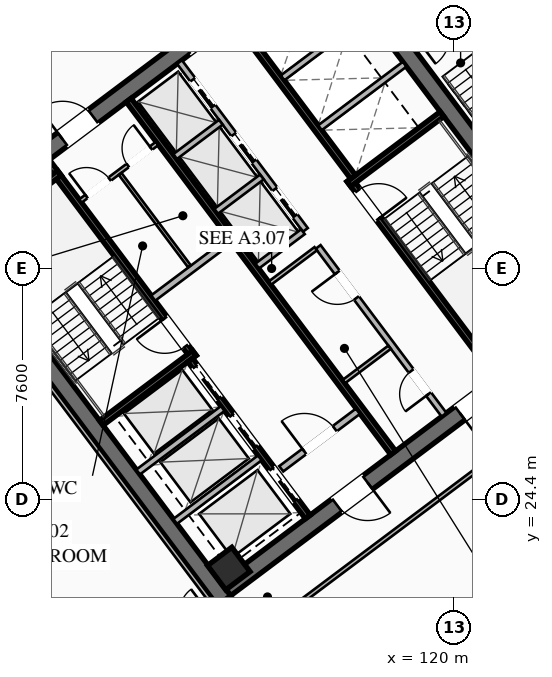
"""IFC4 building model, lengths in metres.
Left out: names, types, materials, properties, quantities, classifications, styles, units other than length and angle.
Written with IfcOpenShell. Run it as: python <this file> out.ifc"""

import sys

from ifc_helpers import new_model, si_unit, direction, frame, frame_2d, origin, origin_2d, place, context, subcontext, project, spatial, rectangle, hollow_rectangle, extrude, element, fill, save


model = new_model("IFC4")
c1 = context("Model", 3, precision=1e-05, world=origin(), true_north=direction((0.0, 1.0)))
c2 = subcontext(c1, "Body", "Model", "MODEL_VIEW")
j1 = project(units=[si_unit("LENGTHUNIT", "METRE"), si_unit("PLANEANGLEUNIT", "RADIAN")], contexts=[c1])
p1 = place(None, origin())
s1 = spatial("IfcSite", under=j1, at=p1, CompositionType="ELEMENT")
p2 = place(p1, origin())
s2 = spatial("IfcBuilding", under=s1, at=p2, CompositionType="ELEMENT")
p3 = place(p2, frame((0.0, 0.0, 181.85)))
s3 = spatial("IfcBuildingStorey", under=s2, at=p3, CompositionType="ELEMENT", Elevation=181.85)
for number, where, z_axis, x_axis in (
    (1, (112.436, 21.077, 0.0), (0.0, 0.0, 1.0), (-0.6, 0.8, 0.0)),
    (2, (115.564, 42.923, 0.0), (0.0, 0.0, 1.0), (0.6, -0.8, 0.0)),
):
    element("IfcWall", number, at=place(p3, frame(where, z_axis=z_axis, x_axis=x_axis)), inside=s3, PredefinedType="SHEAR", context=c2, shape_type="SweptSolid", body=[
        extrude(rectangle(XDim=15.6, YDim=0.55, at=frame_2d((7.8, 0.0))), origin(), (0.0, 0.0, 1.0), 3.55),
    ])
p4 = place(p3, frame((124.539, 30.498, 0.0), z_axis=(0.0, 0.0, 1.0), x_axis=(-0.799998054672, -0.600002593761, 0.0)))
e3 = element("IfcWall", 3, at=p4, inside=s3, PredefinedType="SHEAR", context=c2, shape_type="SweptSolid", body=[
    extrude(rectangle(XDim=15.06, YDim=0.55, at=frame_2d((7.53, 0.0))), origin(), (0.0, 0.0, 1.0), 3.55),
])
p5 = place(p4, frame((9.23, 0.0, 0.0)))
e4 = element("IfcOpeningElement", 4, at=p5, cuts=e3, PredefinedType="OPENING", context=c2, shape_type="SweptSolid", body=[
    extrude(rectangle(XDim=1.25, YDim=2.25, at=frame_2d((0.625, 1.125))), frame((0.0, 0.285, 0.0), z_axis=(0.0, -1.0, 0.0), x_axis=(1.0, 0.0, 0.0)), (0.0, 0.0, 1.0), 0.57),
])
p6 = place(p4, frame((4.18, 0.0, 0.0)))
e5 = element("IfcOpeningElement", 5, at=p6, cuts=e3, PredefinedType="OPENING", context=c2, shape_type="SweptSolid", body=[
    extrude(rectangle(XDim=1.25, YDim=2.25, at=frame_2d((0.625, 1.125))), frame((0.0, 0.285, 0.0), z_axis=(0.0, -1.0, 0.0), x_axis=(1.0, 0.0, 0.0)), (0.0, 0.0, 1.0), 0.57),
])
p7 = place(p3, frame((103.461, 33.502, 0.0), z_axis=(0.0, 0.0, 1.0), x_axis=(0.799998054672, 0.600002593761, 0.0)))
e6 = element("IfcWall", 6, at=p7, inside=s3, PredefinedType="SHEAR", context=c2, shape_type="SweptSolid", body=[
    extrude(rectangle(XDim=15.06, YDim=0.55, at=frame_2d((7.53, 0.0))), origin(), (0.0, 0.0, 1.0), 3.55),
])
p8 = place(p7, frame((4.58, 0.0, 0.0)))
e7 = element("IfcOpeningElement", 7, at=p8, cuts=e6, PredefinedType="OPENING", context=c2, shape_type="SweptSolid", body=[
    extrude(rectangle(XDim=1.25, YDim=2.25, at=frame_2d((0.625, 1.125))), frame((0.0, 0.285, 0.0), z_axis=(0.0, -1.0, 0.0), x_axis=(1.0, 0.0, 0.0)), (0.0, 0.0, 1.0), 0.57),
])
p9 = place(p7, frame((9.63, 0.0, 0.0)))
e8 = element("IfcOpeningElement", 8, at=p9, cuts=e6, PredefinedType="OPENING", context=c2, shape_type="SweptSolid", body=[
    extrude(rectangle(XDim=1.25, YDim=2.25, at=frame_2d((0.625, 1.125))), frame((0.0, 0.285, 0.0), z_axis=(0.0, -1.0, 0.0), x_axis=(1.0, 0.0, 0.0)), (0.0, 0.0, 1.0), 0.57),
])
p10 = place(p3, frame((112.59, 22.13, 0.0), z_axis=(0.0, 0.0, 1.0), x_axis=(0.799999996291, 0.600000004945, 0.0)))
e9 = element("IfcColumn", 9, at=p10, inside=s3, PredefinedType="COLUMN", context=c2, shape_type="SweptSolid", body=[
    extrude(hollow_rectangle(XDim=1.0, YDim=1.0, WallThickness=0.04, at=origin_2d()), origin(), (0.0, 0.0, 1.0), 3.37),
])
p11 = place(p3, frame((111.44, 29.08, 0.0), z_axis=(0.0, 0.0, 1.0), x_axis=(-0.59999029481, 0.8000072788, 0.0)))
e10 = element("IfcWall", 10, at=p11, inside=s3, PredefinedType="SHEAR", context=c2, shape_type="SweptSolid", body=[
    extrude(rectangle(XDim=8.05, YDim=0.2, at=frame_2d((4.025, 0.0))), origin(), (0.0, 0.0, 1.0), 3.37),
])
p12 = place(p11, frame((0.45, 0.0, 0.0)))
e11 = element("IfcOpeningElement", 11, at=p12, cuts=e10, PredefinedType="OPENING", context=c2, shape_type="SweptSolid", body=[
    extrude(rectangle(XDim=1.15, YDim=2.2, at=frame_2d((0.575, 1.1))), frame((0.0, 0.11, 0.0), z_axis=(0.0, -1.0, 0.0), x_axis=(1.0, 0.0, 0.0)), (0.0, 0.0, 1.0), 0.22),
])
for number, where, z_axis, x_axis in (
    (12, (108.396, 26.922, 0.0), (0.0, 0.0, 1.0), (0.8, 0.6, 0.0)),
    (13, (103.956, 32.842, 0.0), (0.0, 0.0, 1.0), (0.8, 0.6, 0.0)),
):
    element("IfcWall", number, at=place(p3, frame(where, z_axis=z_axis, x_axis=x_axis)), inside=s3, PredefinedType="SHEAR", context=c2, shape_type="SweptSolid", body=[
        extrude(rectangle(XDim=3.83, YDim=0.2, at=frame_2d((1.915, 0.0))), origin(), (0.0, 0.0, 1.0), 3.37),
    ])
p13 = place(p3, frame((116.56, 34.92, 0.0), z_axis=(0.0, 0.0, 1.0), x_axis=(0.59999029481, -0.8000072788, 0.0)))
e14 = element("IfcWall", 14, at=p13, inside=s3, PredefinedType="SHEAR", context=c2, shape_type="SweptSolid", body=[
    extrude(rectangle(XDim=8.05, YDim=0.2, at=frame_2d((4.025, 0.0))), origin(), (0.0, 0.0, 1.0), 3.37),
])
p14 = place(p13, frame((0.45, 0.0, 0.0)))
e15 = element("IfcOpeningElement", 15, at=p14, cuts=e14, PredefinedType="OPENING", context=c2, shape_type="SweptSolid", body=[
    extrude(rectangle(XDim=1.15, YDim=2.2, at=frame_2d((0.575, 1.1))), frame((0.0, 0.11, 0.0), z_axis=(0.0, -1.0, 0.0), x_axis=(1.0, 0.0, 0.0)), (0.0, 0.0, 1.0), 0.22),
])
p15 = place(p3, frame((116.54, 34.78, 0.0), z_axis=(0.0, 0.0, 1.0), x_axis=(0.800015298837, 0.599979601008, 0.0)))
e16 = element("IfcWall", 16, at=p15, inside=s3, PredefinedType="SHEAR", context=c2, shape_type="SweptSolid", body=[
    extrude(rectangle(XDim=3.83, YDim=0.2, at=frame_2d((1.915, 0.0))), origin(), (0.0, 0.0, 1.0), 3.37),
])
p16 = place(p3, frame((117.998, 25.936, 0.0), z_axis=(0.0, 0.0, 1.0), x_axis=(-0.600002693989, 0.799997979501, 0.0)))
e17 = element("IfcWall", 17, at=p16, inside=s3, PredefinedType="SHEAR", context=c2, shape_type="SweptSolid", body=[
    extrude(rectangle(XDim=14.5, YDim=0.2, at=frame_2d((7.25, 0.0))), origin(), (0.0, 0.0, 1.0), 3.37),
])
p17 = place(p3, frame((110.104, 31.028, 0.0), z_axis=(0.0, 0.0, 1.0), x_axis=(0.800018601094, 0.59997519774, 0.0)))
e18 = element("IfcWall", 18, at=p17, inside=s3, PredefinedType="SOLIDWALL", context=c2, shape_type="SweptSolid", body=[
    extrude(rectangle(XDim=3.15, YDim=0.22, at=frame_2d((1.575, 0.0))), origin(), (0.0, 0.0, 1.0), 2.723),
])
p18 = place(p3, frame((114.316, 25.412, 0.0), z_axis=(0.0, 0.0, 1.0), x_axis=(0.800018601094, 0.59997519774, 0.0)))
e19 = element("IfcWall", 19, at=p18, inside=s3, PredefinedType="SOLIDWALL", context=c2, shape_type="SweptSolid", body=[
    extrude(rectangle(XDim=3.15, YDim=0.22, at=frame_2d((1.575, 0.0))), origin(), (0.0, 0.0, 1.0), 2.723),
])
p19 = place(p18, frame((0.95, 0.0, 0.0)))
e20 = element("IfcOpeningElement", 20, at=p19, cuts=e19, PredefinedType="OPENING", context=c2, shape_type="SweptSolid", body=[
    extrude(rectangle(XDim=1.25, YDim=2.25, at=frame_2d((0.625, 1.125))), frame((0.0, 0.12, 0.0), z_axis=(0.0, -1.0, 0.0), x_axis=(1.0, 0.0, 0.0)), (0.0, 0.0, 1.0), 0.24),
])
p20 = place(p3, frame((115.19, 23.83, 0.0), z_axis=(0.0, 0.0, 1.0), x_axis=(-0.599993943644, 0.800004542231, 0.0)))
e21 = element("IfcWall", 21, at=p20, inside=s3, PredefinedType="SHEAR", context=c2, shape_type="SweptSolid", body=[
    extrude(rectangle(XDim=6.45, YDim=0.2, at=frame_2d((3.225, 0.0))), origin(), (0.0, 0.0, 1.0), 3.37),
])
p21 = place(p20, frame((4.875, 0.0, 0.0)))
e22 = element("IfcOpeningElement", 22, at=p21, cuts=e21, PredefinedType="OPENING", context=c2, shape_type="SweptSolid", body=[
    extrude(rectangle(XDim=1.3, YDim=2.25, at=frame_2d((0.65, 1.125))), frame((0.0, 0.11, 0.0), z_axis=(0.0, -1.0, 0.0), x_axis=(1.0, 0.0, 0.0)), (0.0, 0.0, 1.0), 0.22),
])
p22 = place(p20, frame((2.875, 0.0, 0.0)))
e23 = element("IfcOpeningElement", 23, at=p22, cuts=e21, PredefinedType="OPENING", context=c2, shape_type="SweptSolid", body=[
    extrude(rectangle(XDim=1.3, YDim=2.25, at=frame_2d((0.65, 1.125))), frame((0.0, 0.11, 0.0), z_axis=(0.0, -1.0, 0.0), x_axis=(1.0, 0.0, 0.0)), (0.0, 0.0, 1.0), 0.22),
])
p23 = place(p20, frame((0.675, 0.0, 0.0)))
e24 = element("IfcOpeningElement", 24, at=p23, cuts=e21, PredefinedType="OPENING", context=c2, shape_type="SweptSolid", body=[
    extrude(rectangle(XDim=1.3, YDim=2.25, at=frame_2d((0.65, 1.125))), frame((0.0, 0.11, 0.0), z_axis=(0.0, -1.0, 0.0), x_axis=(1.0, 0.0, 0.0)), (0.0, 0.0, 1.0), 0.22),
])
for number, where, z_axis, x_axis in (
    (25, (110.826, 23.682, 0.0), (0.0, 0.0, 1.0), (0.8, 0.6, 0.0)),
    (26, (109.608, 25.306, 0.0), (0.0, 0.0, 1.0), (0.8, 0.6, 0.0)),
):
    element("IfcWall", number, at=place(p3, frame(where, z_axis=z_axis, x_axis=x_axis)), inside=s3, PredefinedType="SOLIDWALL", context=c2, shape_type="SweptSolid", body=[
        extrude(rectangle(XDim=3.48, YDim=0.2, at=frame_2d((1.74, 0.0))), origin(), (0.0, 0.0, 1.0), 3.37),
    ])
p24 = place(p3, frame((112.81, 40.17, 0.0), z_axis=(0.0, 0.0, 1.0), x_axis=(0.599993943644, -0.800004542231, 0.0)))
e27 = element("IfcWall", 27, at=p24, inside=s3, PredefinedType="SHEAR", context=c2, shape_type="SweptSolid", body=[
    extrude(rectangle(XDim=6.45, YDim=0.2, at=frame_2d((3.225, 0.0))), origin(), (0.0, 0.0, 1.0), 3.37),
])
for number, where, z_axis, x_axis in (
    (28, (115.59, 36.63, 0.0), (0.0, 0.0, 1.0), (0.8, 0.6, 0.0)),
    (29, (114.36, 38.27, 0.0), (0.0, 0.0, 1.0), (0.8, 0.6, 0.0)),
):
    element("IfcWall", number, at=place(p3, frame(where, z_axis=z_axis, x_axis=x_axis)), inside=s3, PredefinedType="SOLIDWALL", context=c2, shape_type="SweptSolid", body=[
        extrude(rectangle(XDim=3.48, YDim=0.2, at=frame_2d((1.74, 0.0))), origin(), (0.0, 0.0, 1.0), 3.37),
    ])
p25 = place(p3, frame((107.71, 34.22, 0.0), z_axis=(0.0, 0.0, 1.0), x_axis=(0.799981399002, 0.60002480053, 0.0)))
e30 = element("IfcWall", 30, at=p25, inside=s3, PredefinedType="PARTITIONING", context=c2, shape_type="SweptSolid", body=[
    extrude(rectangle(XDim=3.15, YDim=0.135, at=frame_2d((1.575, 0.0))), origin(), (0.0, 0.0, 1.0), 2.723),
])
p26 = place(p25, frame((0.25, 0.0, 0.0)))
e31 = element("IfcOpeningElement", 31, at=p26, cuts=e30, PredefinedType="OPENING", context=c2, shape_type="SweptSolid", body=[
    extrude(rectangle(XDim=0.95, YDim=2.05, at=frame_2d((0.475, 1.025))), frame((0.0, 0.077, 0.0), z_axis=(0.0, -1.0, 0.0), x_axis=(1.0, 0.0, 0.0)), (0.0, 0.0, 1.0), 0.155),
])
p27 = place(p25, frame((1.95, 0.0, 0.0)))
e32 = element("IfcOpeningElement", 32, at=p27, cuts=e30, PredefinedType="OPENING", context=c2, shape_type="SweptSolid", body=[
    extrude(rectangle(XDim=0.95, YDim=2.05, at=frame_2d((0.475, 1.025))), frame((0.0, 0.077, 0.0), z_axis=(0.0, -1.0, 0.0), x_axis=(1.0, 0.0, 0.0)), (0.0, 0.0, 1.0), 0.155),
])
p28 = place(p3, frame((111.296, 32.072, 0.0), z_axis=(0.0, 0.0, 1.0), x_axis=(-0.59995887973, 0.800030838552, 0.0)))
e33 = element("IfcWall", 33, at=p28, inside=s3, PredefinedType="PARTITIONING", context=c2, shape_type="SweptSolid", body=[
    extrude(rectangle(XDim=3.8, YDim=0.11, at=frame_2d((1.9, 0.0))), origin(), (0.0, 0.0, 1.0), 2.723),
])
p29 = place(p3, frame((119.67, 27.19, 0.0), z_axis=(0.0, 0.0, 1.0), x_axis=(-0.599988677396, 0.800008491828, 0.0)))
e34 = element("IfcWall", 34, at=p29, inside=s3, PredefinedType="SOLIDWALL", context=c2, shape_type="SweptSolid", body=[
    extrude(rectangle(XDim=6.9, YDim=0.2, at=frame_2d((3.45, 0.0))), origin(), (0.0, 0.0, 1.0), 2.723),
])
p30 = place(p29, frame((0.85, 0.0, 0.0)))
e35 = element("IfcOpeningElement", 35, at=p30, cuts=e34, PredefinedType="OPENING", context=c2, shape_type="SweptSolid", body=[
    extrude(rectangle(XDim=0.95, YDim=2.05, at=frame_2d((0.475, 1.025))), frame((0.0, 0.11, 0.0), z_axis=(0.0, -1.0, 0.0), x_axis=(1.0, 0.0, 0.0)), (0.0, 0.0, 1.0), 0.22),
])
p31 = place(p29, frame((4.8, 0.0, 0.0)))
e36 = element("IfcOpeningElement", 36, at=p31, cuts=e34, PredefinedType="OPENING", context=c2, shape_type="SweptSolid", body=[
    extrude(rectangle(XDim=1.05, YDim=2.2, at=frame_2d((0.525, 1.1))), frame((0.0, 0.11, 0.0), z_axis=(0.0, -1.0, 0.0), x_axis=(1.0, 0.0, 0.0)), (0.0, 0.0, 1.0), 0.22),
])
for number, where, z_axis, x_axis in (
    (37, (113.946, 31.522, 0.0), (0.0, 0.0, 1.0), (0.8, 0.6, 0.0)),
    (38, (116.376, 28.282, 0.0), (0.0, 0.0, 1.0), (0.8, 0.6, 0.0)),
):
    element("IfcWall", number, at=place(p3, frame(where, z_axis=z_axis, x_axis=x_axis)), inside=s3, PredefinedType="PARTITIONING", context=c2, shape_type="SweptSolid", body=[
        extrude(rectangle(XDim=1.88, YDim=0.135, at=frame_2d((0.94, 0.0))), origin(), (0.0, 0.0, 1.0), 2.723),
    ])
p32 = place(p3, frame((115.11, 33.27, 0.0), z_axis=(0.0, 0.0, 1.0), x_axis=(-0.600011322243, 0.799991508192, 0.0)))
e39 = element("IfcWall", 39, at=p32, inside=s3, PredefinedType="SOLIDWALL", context=c2, shape_type="SweptSolid", body=[
    extrude(rectangle(XDim=6.9, YDim=0.2, at=frame_2d((3.45, 0.0))), origin(), (0.0, 0.0, 1.0), 3.37),
])
p33 = place(p32, frame((0.575, 0.0, 0.0)))
e40 = element("IfcOpeningElement", 40, at=p33, cuts=e39, PredefinedType="OPENING", context=c2, shape_type="SweptSolid", body=[
    extrude(rectangle(XDim=1.1, YDim=2.2, at=frame_2d((0.55, 1.1))), frame((0.0, 0.11, 0.0), z_axis=(0.0, -1.0, 0.0), x_axis=(1.0, 0.0, 0.0)), (0.0, 0.0, 1.0), 0.22),
])
p34 = place(p32, frame((2.825, 0.0, 0.0)))
e41 = element("IfcOpeningElement", 41, at=p34, cuts=e39, PredefinedType="OPENING", context=c2, shape_type="SweptSolid", body=[
    extrude(rectangle(XDim=1.1, YDim=2.2, at=frame_2d((0.55, 1.1))), frame((0.0, 0.11, 0.0), z_axis=(0.0, -1.0, 0.0), x_axis=(1.0, 0.0, 0.0)), (0.0, 0.0, 1.0), 0.22),
])
p35 = place(p32, frame((5.075, 0.0, 0.0)))
e42 = element("IfcOpeningElement", 42, at=p35, cuts=e39, PredefinedType="OPENING", context=c2, shape_type="SweptSolid", body=[
    extrude(rectangle(XDim=1.1, YDim=2.2, at=frame_2d((0.55, 1.1))), frame((0.0, 0.11, 0.0), z_axis=(0.0, -1.0, 0.0), x_axis=(1.0, 0.0, 0.0)), (0.0, 0.0, 1.0), 0.22),
])
p36 = place(p3, frame((113.526, 32.082, 0.0), z_axis=(0.0, 0.0, 1.0), x_axis=(0.800046745961, 0.599937666993, 0.0)))
e43 = element("IfcWall", 43, at=p36, inside=s3, PredefinedType="SOLIDWALL", context=c2, shape_type="SweptSolid", body=[
    extrude(rectangle(XDim=1.88, YDim=0.2, at=frame_2d((0.94, 0.0))), origin(), (0.0, 0.0, 1.0), 3.37),
])
p37 = place(p3, frame((112.176, 33.882, 0.0), z_axis=(0.0, 0.0, 1.0), x_axis=(0.8, 0.6, 0.0)))
e44 = element("IfcWall", 44, at=p37, inside=s3, PredefinedType="SOLIDWALL", context=c2, shape_type="SweptSolid", body=[
    extrude(rectangle(XDim=1.88, YDim=0.2, at=frame_2d((0.94, 0.0))), origin(), (0.0, 0.0, 1.0), 3.37),
])
p38 = place(p3, frame((110.826, 35.682, 0.0), z_axis=(0.0, 0.0, 1.0), x_axis=(0.799984418148, 0.600020775241, 0.0)))
e45 = element("IfcWall", 45, at=p38, inside=s3, PredefinedType="SOLIDWALL", context=c2, shape_type="SweptSolid", body=[
    extrude(rectangle(XDim=1.88, YDim=0.2, at=frame_2d((0.94, 0.0))), origin(), (0.0, 0.0, 1.0), 3.37),
])
p39 = place(p3, frame((96.268, 31.726, 0.0), z_axis=(0.0, 0.0, 1.0), x_axis=(0.8, 0.6, 0.0)))
e46 = element("IfcWall", 46, at=p39, inside=s3, PredefinedType="PARTITIONING", context=c2, shape_type="SweptSolid", body=[
    extrude(rectangle(XDim=28.7, YDim=0.135, at=frame_2d((14.35, 0.0))), origin(), (0.0, 0.0, 1.0), 2.723),
])
p40 = place(p39, frame((0.3, 0.0, 0.0)))
e47 = element("IfcOpeningElement", 47, at=p40, cuts=e46, PredefinedType="OPENING", context=c2, shape_type="SweptSolid", body=[
    extrude(rectangle(XDim=0.95, YDim=2.05, at=frame_2d((0.475, 1.025))), frame((0.0, 0.077, 0.0), z_axis=(0.0, -1.0, 0.0), x_axis=(1.0, 0.0, 0.0)), (0.0, 0.0, 1.0), 0.155),
])
p41 = place(p39, frame((27.45, 0.0, 0.0)))
e48 = element("IfcOpeningElement", 48, at=p41, cuts=e46, PredefinedType="OPENING", context=c2, shape_type="SweptSolid", body=[
    extrude(rectangle(XDim=0.95, YDim=2.05, at=frame_2d((0.475, 1.025))), frame((0.0, 0.077, 0.0), z_axis=(0.0, -1.0, 0.0), x_axis=(1.0, 0.0, 0.0)), (0.0, 0.0, 1.0), 0.155),
])
p42 = place(p3, frame((131.09, 33.13, 0.0), z_axis=(0.0, 0.0, 1.0), x_axis=(-0.800003062365, -0.599995916825, 0.0)))
e49 = element("IfcWall", 49, at=p42, inside=s3, PredefinedType="PARTITIONING", context=c2, shape_type="SweptSolid", body=[
    extrude(rectangle(XDim=28.7, YDim=0.135, at=frame_2d((14.35, 0.0))), origin(), (0.0, 0.0, 1.0), 2.723),
])
p43 = place(p42, frame((27.37, 0.0, 0.0)))
e50 = element("IfcOpeningElement", 50, at=p43, cuts=e49, PredefinedType="OPENING", context=c2, shape_type="SweptSolid", body=[
    extrude(rectangle(XDim=0.95, YDim=2.05, at=frame_2d((0.475, 1.025))), frame((0.0, 0.077, 0.0), z_axis=(0.0, -1.0, 0.0), x_axis=(1.0, 0.0, 0.0)), (0.0, 0.0, 1.0), 0.155),
])
p44 = place(p42, frame((0.38, 0.0, 0.0)))
e51 = element("IfcOpeningElement", 51, at=p44, cuts=e49, PredefinedType="OPENING", context=c2, shape_type="SweptSolid", body=[
    extrude(rectangle(XDim=0.95, YDim=2.05, at=frame_2d((0.475, 1.025))), frame((0.0, 0.077, 0.0), z_axis=(0.0, -1.0, 0.0), x_axis=(1.0, 0.0, 0.0)), (0.0, 0.0, 1.0), 0.155),
])
p45 = place(p3, frame((112.104, 20.928, 0.0), z_axis=(0.0, 0.0, 1.0), x_axis=(-0.599994940075, 0.800003794918, 0.0)))
e52 = element("IfcWall", 52, at=p45, inside=s3, PredefinedType="PARTITIONING", context=c2, shape_type="SweptSolid", body=[
    extrude(rectangle(XDim=15.44, YDim=0.135, at=frame_2d((7.72, 0.0))), origin(), (0.0, 0.0, 1.0), 2.723),
])
p46 = place(p8, origin())
e53 = element("IfcDoor", 53, at=p46, inside=s3, OperationType="SINGLE_SWING_LEFT", PredefinedType="DOOR", context=c2, shape_type="SweptSolid", body=[
    extrude(rectangle(XDim=1.25, YDim=2.25, at=frame_2d((0.625, 1.125))), frame((0.0, 0.025, 0.0), z_axis=(0.0, -1.0, 0.0), x_axis=(1.0, 0.0, 0.0)), (0.0, 0.0, 1.0), 0.05),
])
fill(e7, e53)
p47 = place(p5, origin())
e54 = element("IfcDoor", 54, at=p47, inside=s3, OperationType="SINGLE_SWING_LEFT", PredefinedType="DOOR", context=c2, shape_type="SweptSolid", body=[
    extrude(rectangle(XDim=1.25, YDim=2.25, at=frame_2d((0.625, 1.125))), frame((0.0, 0.025, 0.0), z_axis=(0.0, -1.0, 0.0), x_axis=(1.0, 0.0, 0.0)), (0.0, 0.0, 1.0), 0.05),
])
fill(e4, e54)
p48 = place(p6, origin())
e55 = element("IfcDoor", 55, at=p48, inside=s3, OperationType="SINGLE_SWING_RIGHT", PredefinedType="DOOR", context=c2, shape_type="SweptSolid", body=[
    extrude(rectangle(XDim=1.25, YDim=2.25, at=frame_2d((0.625, 1.125))), frame((0.0, 0.025, 0.0), z_axis=(0.0, -1.0, 0.0), x_axis=(1.0, 0.0, 0.0)), (0.0, 0.0, 1.0), 0.05),
])
fill(e5, e55)
p49 = place(p12, origin())
e56 = element("IfcDoor", 56, at=p49, inside=s3, OperationType="SINGLE_SWING_RIGHT", PredefinedType="DOOR", context=c2, shape_type="SweptSolid", body=[
    extrude(rectangle(XDim=1.15, YDim=2.2, at=frame_2d((0.575, 1.1))), frame((0.0, 0.025, 0.0), z_axis=(0.0, -1.0, 0.0), x_axis=(1.0, 0.0, 0.0)), (0.0, 0.0, 1.0), 0.05),
])
fill(e11, e56)
p50 = place(p14, origin())
e57 = element("IfcDoor", 57, at=p50, inside=s3, OperationType="SINGLE_SWING_RIGHT", PredefinedType="DOOR", context=c2, shape_type="SweptSolid", body=[
    extrude(rectangle(XDim=1.15, YDim=2.2, at=frame_2d((0.575, 1.1))), frame((0.0, 0.025, 0.0), z_axis=(0.0, -1.0, 0.0), x_axis=(1.0, 0.0, 0.0)), (0.0, 0.0, 1.0), 0.05),
])
fill(e15, e57)
p51 = place(p19, origin())
e58 = element("IfcDoor", 58, at=p51, inside=s3, OperationType="SINGLE_SWING_LEFT", PredefinedType="DOOR", context=c2, shape_type="SweptSolid", body=[
    extrude(rectangle(XDim=1.25, YDim=2.25, at=frame_2d((0.625, 1.125))), frame((0.0, 0.025, 0.0), z_axis=(0.0, -1.0, 0.0), x_axis=(1.0, 0.0, 0.0)), (0.0, 0.0, 1.0), 0.05),
])
fill(e20, e58)
p52 = place(p26, origin())
e59 = element("IfcDoor", 59, at=p52, inside=s3, OperationType="SINGLE_SWING_LEFT", PredefinedType="DOOR", context=c2, shape_type="SweptSolid", body=[
    extrude(rectangle(XDim=0.95, YDim=2.05, at=frame_2d((0.475, 1.025))), frame((0.0, 0.025, 0.0), z_axis=(0.0, -1.0, 0.0), x_axis=(1.0, 0.0, 0.0)), (0.0, 0.0, 1.0), 0.05),
])
fill(e31, e59)
p53 = place(p27, origin())
e60 = element("IfcDoor", 60, at=p53, inside=s3, OperationType="SINGLE_SWING_RIGHT", PredefinedType="DOOR", context=c2, shape_type="SweptSolid", body=[
    extrude(rectangle(XDim=0.95, YDim=2.05, at=frame_2d((0.475, 1.025))), frame((0.0, 0.025, 0.0), z_axis=(0.0, -1.0, 0.0), x_axis=(1.0, 0.0, 0.0)), (0.0, 0.0, 1.0), 0.05),
])
fill(e32, e60)
p54 = place(p30, origin())
e61 = element("IfcDoor", 61, at=p54, inside=s3, OperationType="SINGLE_SWING_LEFT", PredefinedType="DOOR", context=c2, shape_type="SweptSolid", body=[
    extrude(rectangle(XDim=0.95, YDim=2.05, at=frame_2d((0.475, 1.025))), frame((0.0, 0.025, 0.0), z_axis=(0.0, -1.0, 0.0), x_axis=(1.0, 0.0, 0.0)), (0.0, 0.0, 1.0), 0.05),
])
fill(e35, e61)
p55 = place(p31, origin())
e62 = element("IfcDoor", 62, at=p55, inside=s3, OperationType="SINGLE_SWING_RIGHT", PredefinedType="DOOR", context=c2, shape_type="SweptSolid", body=[
    extrude(rectangle(XDim=1.05, YDim=2.2, at=frame_2d((0.525, 1.1))), frame((0.0, 0.025, 0.0), z_axis=(0.0, -1.0, 0.0), x_axis=(1.0, 0.0, 0.0)), (0.0, 0.0, 1.0), 0.05),
])
fill(e36, e62)
p56 = place(p21, origin())
e63 = element("IfcDoor", 63, at=p56, inside=s3, OperationType="SLIDING_TO_LEFT", PredefinedType="DOOR", context=c2, shape_type="SweptSolid", body=[
    extrude(rectangle(XDim=1.3, YDim=2.25, at=frame_2d((0.65, 1.125))), frame((0.0, 0.025, 0.0), z_axis=(0.0, -1.0, 0.0), x_axis=(1.0, 0.0, 0.0)), (0.0, 0.0, 1.0), 0.05),
])
fill(e22, e63)
p57 = place(p22, origin())
e64 = element("IfcDoor", 64, at=p57, inside=s3, OperationType="SLIDING_TO_LEFT", PredefinedType="DOOR", context=c2, shape_type="SweptSolid", body=[
    extrude(rectangle(XDim=1.3, YDim=2.25, at=frame_2d((0.65, 1.125))), frame((0.0, 0.025, 0.0), z_axis=(0.0, -1.0, 0.0), x_axis=(1.0, 0.0, 0.0)), (0.0, 0.0, 1.0), 0.05),
])
fill(e23, e64)
p58 = place(p23, origin())
e65 = element("IfcDoor", 65, at=p58, inside=s3, OperationType="SLIDING_TO_LEFT", PredefinedType="DOOR", context=c2, shape_type="SweptSolid", body=[
    extrude(rectangle(XDim=1.3, YDim=2.25, at=frame_2d((0.65, 1.125))), frame((0.0, 0.025, 0.0), z_axis=(0.0, -1.0, 0.0), x_axis=(1.0, 0.0, 0.0)), (0.0, 0.0, 1.0), 0.05),
])
fill(e24, e65)
p59 = place(p33, origin())
e66 = element("IfcDoor", 66, at=p59, inside=s3, OperationType="SLIDING_TO_LEFT", PredefinedType="DOOR", context=c2, shape_type="SweptSolid", body=[
    extrude(rectangle(XDim=1.1, YDim=2.2, at=frame_2d((0.55, 1.1))), frame((0.0, 0.025, 0.0), z_axis=(0.0, -1.0, 0.0), x_axis=(1.0, 0.0, 0.0)), (0.0, 0.0, 1.0), 0.05),
])
fill(e40, e66)
p60 = place(p34, origin())
e67 = element("IfcDoor", 67, at=p60, inside=s3, OperationType="SLIDING_TO_LEFT", PredefinedType="DOOR", context=c2, shape_type="SweptSolid", body=[
    extrude(rectangle(XDim=1.1, YDim=2.2, at=frame_2d((0.55, 1.1))), frame((0.0, 0.025, 0.0), z_axis=(0.0, -1.0, 0.0), x_axis=(1.0, 0.0, 0.0)), (0.0, 0.0, 1.0), 0.05),
])
fill(e41, e67)
p61 = place(p35, origin())
e68 = element("IfcDoor", 68, at=p61, inside=s3, OperationType="SLIDING_TO_LEFT", PredefinedType="DOOR", context=c2, shape_type="SweptSolid", body=[
    extrude(rectangle(XDim=1.1, YDim=2.2, at=frame_2d((0.55, 1.1))), frame((0.0, 0.025, 0.0), z_axis=(0.0, -1.0, 0.0), x_axis=(1.0, 0.0, 0.0)), (0.0, 0.0, 1.0), 0.05),
])
fill(e42, e68)
save(model, sys.argv[1])
